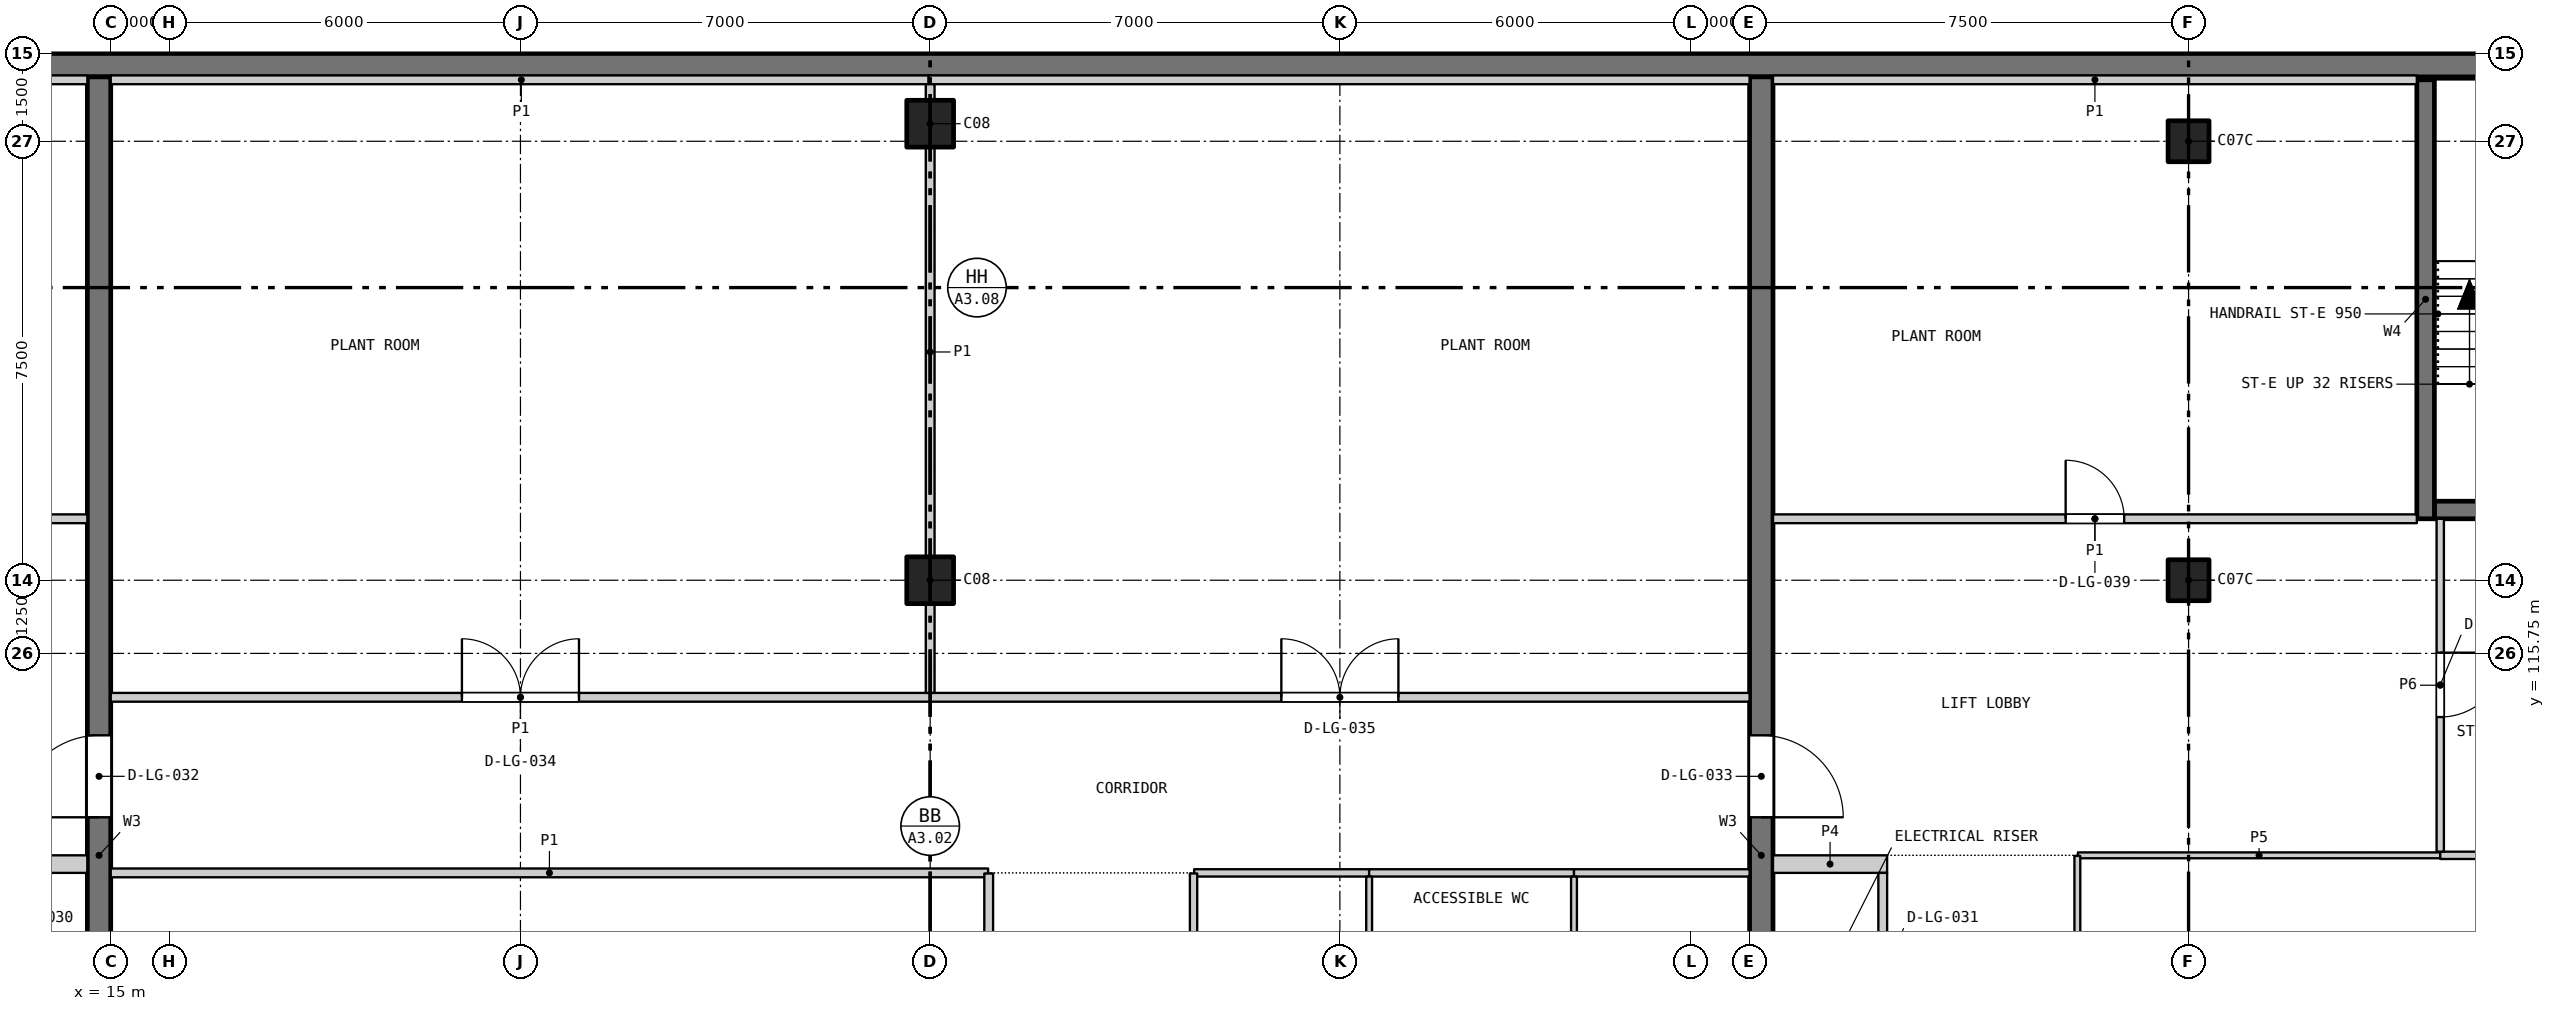
"""IFC4 building model, lengths in metres.
Left out: names, types, materials, properties, quantities, classifications, styles, units other than length and angle.
Written with IfcOpenShell. Run it as: python <this file> out.ifc"""

import sys

from ifc_helpers import new_model, si_unit, direction, frame, frame_2d, origin, origin_2d, place, context, subcontext, project, spatial, rectangle, extrude, element, fill, save


model = new_model("IFC4")
c1 = context("Model", 3, precision=1e-05, world=origin(), true_north=direction((0.0, 1.0)))
c2 = subcontext(c1, "Body", "Model", "MODEL_VIEW")
j1 = project(units=[si_unit("LENGTHUNIT", "METRE"), si_unit("PLANEANGLEUNIT", "RADIAN")], contexts=[c1])
p1 = place(None, origin())
s1 = spatial("IfcSite", under=j1, at=p1, CompositionType="ELEMENT")
p2 = place(p1, origin())
s2 = spatial("IfcBuilding", under=s1, at=p2, CompositionType="ELEMENT")
p3 = place(p2, frame((0.0, 0.0, -5.0)))
s3 = spatial("IfcBuildingStorey", under=s2, at=p3, CompositionType="ELEMENT", Elevation=-5.0)
for number, where, z_axis, x_axis in (
    (1, (50.5, 117.0, 0.0), (0.0, 0.0, 1.0), (1.0, 0.0, 0.0)),
    (2, (50.5, 124.5, 0.0), (0.0, 0.0, 1.0), (1.0, 0.0, 0.0)),
):
    element("IfcColumn", number, at=place(p3, frame(where, z_axis=z_axis, x_axis=x_axis)), inside=s3, PredefinedType="COLUMN", context=c2, shape_type="SweptSolid", body=[
        extrude(rectangle(XDim=0.7, YDim=0.7, at=origin_2d()), origin(), (0.0, 0.0, 1.0), 5.0),
    ])
for number, where, z_axis, x_axis in (
    (3, (29.0, 117.0, 0.0), (0.0, 0.0, 1.0), (1.0, 0.0, 0.0)),
    (4, (29.0, 124.8, 0.0), (0.0, 0.0, 1.0), (1.0, 0.0, 0.0)),
):
    element("IfcColumn", number, at=place(p3, frame(where, z_axis=z_axis, x_axis=x_axis)), inside=s3, PredefinedType="COLUMN", context=c2, shape_type="SweptSolid", body=[
        extrude(rectangle(XDim=0.8, YDim=0.8, at=origin_2d()), origin(), (0.0, 0.0, 1.0), 5.0),
    ])
p4 = place(p3, frame((0.4, 125.8, 0.0), z_axis=(0.0, 0.0, 1.0), x_axis=(1.0, 0.0, 0.0)))
e5 = element("IfcWall", 5, at=p4, inside=s3, PredefinedType="SOLIDWALL", context=c2, shape_type="SweptSolid", body=[
    extrude(rectangle(XDim=57.2, YDim=0.4, at=frame_2d((28.6, 0.0))), origin(), (0.0, 0.0, 1.0), 5.0),
])
p5 = place(p3, frame((14.8, 99.0, 0.0), z_axis=(0.0, 0.0, 1.0), x_axis=(0.0, 1.0, 0.0)))
e6 = element("IfcWall", 6, at=p5, inside=s3, PredefinedType="SHEAR", context=c2, shape_type="SweptSolid", body=[
    extrude(rectangle(XDim=26.6, YDim=0.4, at=frame_2d((13.3, 0.0))), origin(), (0.0, 0.0, 1.0), 5.0),
])
p6 = place(p5, frame((13.95, 0.0, 0.0)))
e7 = element("IfcOpeningElement", 7, at=p6, cuts=e6, PredefinedType="OPENING", context=c2, shape_type="SweptSolid", body=[
    extrude(rectangle(XDim=1.4, YDim=2.4, at=frame_2d((0.7, 1.2))), frame((0.0, 0.21, 0.0), z_axis=(0.0, -1.0, 0.0), x_axis=(1.0, 0.0, 0.0)), (0.0, 0.0, 1.0), 0.42),
])
p7 = place(p3, frame((43.2, 99.0, 0.0), z_axis=(0.0, 0.0, 1.0), x_axis=(0.0, 1.0, 0.0)))
e8 = element("IfcWall", 8, at=p7, inside=s3, PredefinedType="SHEAR", context=c2, shape_type="SweptSolid", body=[
    extrude(rectangle(XDim=26.6, YDim=0.4, at=frame_2d((13.3, 0.0))), origin(), (0.0, 0.0, 1.0), 5.0),
])
p8 = place(p7, frame((13.95, 0.0, 0.0)))
e9 = element("IfcOpeningElement", 9, at=p8, cuts=e8, PredefinedType="OPENING", context=c2, shape_type="SweptSolid", body=[
    extrude(rectangle(XDim=1.4, YDim=2.4, at=frame_2d((0.7, 1.2))), frame((0.0, 0.21, 0.0), z_axis=(0.0, -1.0, 0.0), x_axis=(1.0, 0.0, 0.0)), (0.0, 0.0, 1.0), 0.42),
])
p9 = place(p3, frame((54.7, 118.2, 0.0), z_axis=(0.0, 0.0, 1.0), x_axis=(1.0, 0.0, 0.0)))
e10 = element("IfcWall", 10, at=p9, inside=s3, PredefinedType="SHEAR", context=c2, shape_type="SweptSolid", body=[
    extrude(rectangle(XDim=3.0, YDim=0.3, at=frame_2d((1.5, 0.0))), origin(), (0.0, 0.0, 1.0), 5.0),
])
p10 = place(p9, frame((0.95, 0.0, 0.0)))
e11 = element("IfcOpeningElement", 11, at=p10, cuts=e10, PredefinedType="OPENING", context=c2, shape_type="SweptSolid", body=[
    extrude(rectangle(XDim=1.1, YDim=2.1, at=frame_2d((0.55, 1.05))), frame((0.0, 0.16, 0.0), z_axis=(0.0, -1.0, 0.0), x_axis=(1.0, 0.0, 0.0)), (0.0, 0.0, 1.0), 0.32),
])
p11 = place(p3, frame((54.55, 118.05, 0.0), z_axis=(0.0, 0.0, 1.0), x_axis=(0.0, 1.0, 0.0)))
e12 = element("IfcWall", 12, at=p11, inside=s3, PredefinedType="SHEAR", context=c2, shape_type="SweptSolid", body=[
    extrude(rectangle(XDim=7.5, YDim=0.3, at=frame_2d((3.75, 0.0))), origin(), (0.0, 0.0, 1.0), 5.0),
])
for number, where, z_axis, x_axis in (
    (13, (12.65, 112.15, 0.0), (0.0, 0.0, 1.0), (1.0, 0.0, 0.0)),
    (14, (43.4, 112.15, 0.0), (0.0, 0.0, 1.0), (1.0, 0.0, 0.0)),
):
    element("IfcWall", number, at=place(p3, frame(where, z_axis=z_axis, x_axis=x_axis)), inside=s3, PredefinedType="PARTITIONING", context=c2, shape_type="SweptSolid", body=[
        extrude(rectangle(XDim=1.95, YDim=0.3, at=frame_2d((0.975, 0.0))), origin(), (0.0, 0.0, 1.0), 4.7),
    ])
p12 = place(p3, frame((45.275, 108.4, 0.0), z_axis=(0.0, 0.0, 1.0), x_axis=(0.0, 1.0, 0.0)))
e15 = element("IfcWall", 15, at=p12, inside=s3, PredefinedType="PARTITIONING", context=c2, shape_type="SweptSolid", body=[
    extrude(rectangle(XDim=3.6, YDim=0.15, at=frame_2d((1.8, 0.0))), origin(), (0.0, 0.0, 1.0), 4.7),
])
p13 = place(p12, frame((1.35, 0.0, 0.0)))
e16 = element("IfcOpeningElement", 16, at=p13, cuts=e15, PredefinedType="OPENING", context=c2, shape_type="SweptSolid", body=[
    extrude(rectangle(XDim=0.9, YDim=2.1, at=frame_2d((0.45, 1.05))), frame((0.0, 0.085, 0.0), z_axis=(0.0, -1.0, 0.0), x_axis=(1.0, 0.0, 0.0)), (0.0, 0.0, 1.0), 0.17),
])
p14 = place(p3, frame((15.0, 112.0, 0.0), z_axis=(0.0, 0.0, 1.0), x_axis=(1.0, 0.0, 0.0)))
e17 = element("IfcWall", 17, at=p14, inside=s3, PredefinedType="PARTITIONING", context=c2, shape_type="SweptSolid", body=[
    extrude(rectangle(XDim=14.99, YDim=0.15, at=frame_2d((7.495, 0.0))), origin(), (0.0, 0.0, 1.0), 4.7),
])
p15 = place(p3, frame((33.51, 112.0, 0.0), z_axis=(0.0, 0.0, 1.0), x_axis=(1.0, 0.0, 0.0)))
e18 = element("IfcWall", 18, at=p15, inside=s3, PredefinedType="PARTITIONING", context=c2, shape_type="SweptSolid", body=[
    extrude(rectangle(XDim=2.99, YDim=0.125, at=frame_2d((1.495, 0.0))), origin(), (0.0, 0.0, 1.0), 4.7),
])
p16 = place(p3, frame((36.5, 112.0, 0.0), z_axis=(0.0, 0.0, 1.0), x_axis=(1.0, 0.0, 0.0)))
e19 = element("IfcWall", 19, at=p16, inside=s3, PredefinedType="PARTITIONING", context=c2, shape_type="SweptSolid", body=[
    extrude(rectangle(XDim=3.5, YDim=0.125, at=frame_2d((1.75, 0.0))), origin(), (0.0, 0.0, 1.0), 4.7),
])
p17 = place(p3, frame((40.0, 112.0, 0.0), z_axis=(0.0, 0.0, 1.0), x_axis=(1.0, 0.0, 0.0)))
e20 = element("IfcWall", 20, at=p17, inside=s3, PredefinedType="PARTITIONING", context=c2, shape_type="SweptSolid", body=[
    extrude(rectangle(XDim=3.0, YDim=0.125, at=frame_2d((1.5, 0.0))), origin(), (0.0, 0.0, 1.0), 4.7),
])
p18 = place(p3, frame((48.61, 112.3, 0.0), z_axis=(0.0, 0.0, 1.0), x_axis=(1.0, 0.0, 0.0)))
e21 = element("IfcWall", 21, at=p18, inside=s3, PredefinedType="PARTITIONING", context=c2, shape_type="SweptSolid", body=[
    extrude(rectangle(XDim=6.19, YDim=0.1, at=frame_2d((3.095, 0.0))), origin(), (0.0, 0.0, 1.0), 4.7),
])
p19 = place(p3, frame((54.8, 112.3, 0.0), z_axis=(0.0, 0.0, 1.0), x_axis=(1.0, 0.0, 0.0)))
e22 = element("IfcWall", 22, at=p19, inside=s3, PredefinedType="PARTITIONING", context=c2, shape_type="SweptSolid", body=[
    extrude(rectangle(XDim=2.8, YDim=0.125, at=frame_2d((1.4, 0.0))), origin(), (0.0, 0.0, 1.0), 4.7),
])
p20 = place(p3, frame((15.0, 115.0, 0.0), z_axis=(0.0, 0.0, 1.0), x_axis=(1.0, 0.0, 0.0)))
e23 = element("IfcWall", 23, at=p20, inside=s3, PredefinedType="PARTITIONING", context=c2, shape_type="SweptSolid", body=[
    extrude(rectangle(XDim=14.0, YDim=0.15, at=frame_2d((7.0, 0.0))), origin(), (0.0, 0.0, 1.0), 4.7),
])
p21 = place(p20, frame((6.0, 0.0, 0.0)))
e24 = element("IfcOpeningElement", 24, at=p21, cuts=e23, PredefinedType="OPENING", context=c2, shape_type="SweptSolid", body=[
    extrude(rectangle(XDim=2.0, YDim=2.4, at=frame_2d((1.0, 1.2))), frame((0.0, 0.085, 0.0), z_axis=(0.0, -1.0, 0.0), x_axis=(1.0, 0.0, 0.0)), (0.0, 0.0, 1.0), 0.17),
])
p22 = place(p3, frame((29.0, 115.0, 0.0), z_axis=(0.0, 0.0, 1.0), x_axis=(1.0, 0.0, 0.0)))
e25 = element("IfcWall", 25, at=p22, inside=s3, PredefinedType="PARTITIONING", context=c2, shape_type="SweptSolid", body=[
    extrude(rectangle(XDim=14.0, YDim=0.15, at=frame_2d((7.0, 0.0))), origin(), (0.0, 0.0, 1.0), 4.7),
])
p23 = place(p22, frame((6.0, 0.0, 0.0)))
e26 = element("IfcOpeningElement", 26, at=p23, cuts=e25, PredefinedType="OPENING", context=c2, shape_type="SweptSolid", body=[
    extrude(rectangle(XDim=2.0, YDim=2.4, at=frame_2d((1.0, 1.2))), frame((0.0, 0.085, 0.0), z_axis=(0.0, -1.0, 0.0), x_axis=(1.0, 0.0, 0.0)), (0.0, 0.0, 1.0), 0.17),
])
p24 = place(p3, frame((3.6, 118.05, 0.0), z_axis=(0.0, 0.0, 1.0), x_axis=(1.0, 0.0, 0.0)))
e27 = element("IfcWall", 27, at=p24, inside=s3, PredefinedType="PARTITIONING", context=c2, shape_type="SweptSolid", body=[
    extrude(rectangle(XDim=11.0, YDim=0.15, at=frame_2d((5.5, 0.0))), origin(), (0.0, 0.0, 1.0), 4.7),
])
p25 = place(p24, frame((5.0, 0.0, 0.0)))
e28 = element("IfcOpeningElement", 28, at=p25, cuts=e27, PredefinedType="OPENING", context=c2, shape_type="SweptSolid", body=[
    extrude(rectangle(XDim=1.0, YDim=2.1, at=frame_2d((0.5, 1.05))), frame((0.0, 0.085, 0.0), z_axis=(0.0, -1.0, 0.0), x_axis=(1.0, 0.0, 0.0)), (0.0, 0.0, 1.0), 0.17),
])
p26 = place(p3, frame((43.4, 118.05, 0.0), z_axis=(0.0, 0.0, 1.0), x_axis=(1.0, 0.0, 0.0)))
e29 = element("IfcWall", 29, at=p26, inside=s3, PredefinedType="PARTITIONING", context=c2, shape_type="SweptSolid", body=[
    extrude(rectangle(XDim=11.0, YDim=0.15, at=frame_2d((5.5, 0.0))), origin(), (0.0, 0.0, 1.0), 4.7),
])
p27 = place(p26, frame((5.0, 0.0, 0.0)))
e30 = element("IfcOpeningElement", 30, at=p27, cuts=e29, PredefinedType="OPENING", context=c2, shape_type="SweptSolid", body=[
    extrude(rectangle(XDim=1.0, YDim=2.1, at=frame_2d((0.5, 1.05))), frame((0.0, 0.085, 0.0), z_axis=(0.0, -1.0, 0.0), x_axis=(1.0, 0.0, 0.0)), (0.0, 0.0, 1.0), 0.17),
])
p28 = place(p3, frame((3.6, 125.55, 0.0), z_axis=(0.0, 0.0, 1.0), x_axis=(1.0, 0.0, 0.0)))
e31 = element("IfcWall", 31, at=p28, inside=s3, PredefinedType="PARTITIONING", context=c2, shape_type="SweptSolid", body=[
    extrude(rectangle(XDim=11.0, YDim=0.15, at=frame_2d((5.5, 0.0))), origin(), (0.0, 0.0, 1.0), 4.7),
])
for number, where, z_axis, x_axis in (
    (32, (15.0, 125.55, 0.0), (0.0, 0.0, 1.0), (1.0, 0.0, 0.0)),
    (33, (28.97, 125.55, 0.0), (0.0, 0.0, 1.0), (1.0, 0.0, 0.0)),
):
    element("IfcWall", number, at=place(p3, frame(where, z_axis=z_axis, x_axis=x_axis)), inside=s3, PredefinedType="PARTITIONING", context=c2, shape_type="SweptSolid", body=[
        extrude(rectangle(XDim=14.03, YDim=0.15, at=frame_2d((7.015, 0.0))), origin(), (0.0, 0.0, 1.0), 4.7),
    ])
p29 = place(p3, frame((43.4, 125.55, 0.0), z_axis=(0.0, 0.0, 1.0), x_axis=(1.0, 0.0, 0.0)))
e34 = element("IfcWall", 34, at=p29, inside=s3, PredefinedType="PARTITIONING", context=c2, shape_type="SweptSolid", body=[
    extrude(rectangle(XDim=11.0, YDim=0.15, at=frame_2d((5.5, 0.0))), origin(), (0.0, 0.0, 1.0), 4.7),
])
p30 = place(p3, frame((29.0, 115.075, 0.0), z_axis=(0.0, 0.0, 1.0), x_axis=(0.0, 1.0, 0.0)))
e35 = element("IfcWall", 35, at=p30, inside=s3, PredefinedType="PARTITIONING", context=c2, shape_type="SweptSolid", body=[
    extrude(rectangle(XDim=1.525, YDim=0.15, at=frame_2d((0.763, 0.0))), origin(), (0.0, 0.0, 1.0), 3.6),
])
p31 = place(p3, frame((29.0, 117.4, 0.0), z_axis=(0.0, 0.0, 1.0), x_axis=(0.0, 1.0, 0.0)))
e36 = element("IfcWall", 36, at=p31, inside=s3, PredefinedType="PARTITIONING", context=c2, shape_type="SweptSolid", body=[
    extrude(rectangle(XDim=7.0, YDim=0.15, at=frame_2d((3.5, 0.0))), origin(), (0.0, 0.0, 1.0), 3.6),
])
p32 = place(p3, frame((29.0, 125.2, 0.0), z_axis=(0.0, 0.0, 1.0), x_axis=(0.0, 1.0, 0.0)))
e37 = element("IfcWall", 37, at=p32, inside=s3, PredefinedType="PARTITIONING", context=c2, shape_type="SweptSolid", body=[
    extrude(rectangle(XDim=0.275, YDim=0.15, at=frame_2d((0.138, 0.0))), origin(), (0.0, 0.0, 1.0), 4.7),
])
p33 = place(p3, frame((30.0, 99.01, 0.0), z_axis=(0.0, 0.0, 1.0), x_axis=(0.0, 1.0, 0.0)))
e38 = element("IfcWall", 38, at=p33, inside=s3, PredefinedType="PARTITIONING", context=c2, shape_type="SweptSolid", body=[
    extrude(rectangle(XDim=12.98, YDim=0.15, at=frame_2d((6.49, 0.0))), origin(), (0.0, 0.0, 1.0), 4.7),
])
p34 = place(p33, frame((5.5, 0.0, 0.0)))
e39 = element("IfcOpeningElement", 39, at=p34, cuts=e38, PredefinedType="OPENING", context=c2, shape_type="SweptSolid", body=[
    extrude(rectangle(XDim=2.0, YDim=2.4, at=frame_2d((1.0, 1.2))), frame((0.0, 0.085, 0.0), z_axis=(0.0, -1.0, 0.0), x_axis=(1.0, 0.0, 0.0)), (0.0, 0.0, 1.0), 0.17),
])
p35 = place(p3, frame((33.5, 99.062, 0.0), z_axis=(0.0, 0.0, 1.0), x_axis=(0.0, 1.0, 0.0)))
e40 = element("IfcWall", 40, at=p35, inside=s3, PredefinedType="PARTITIONING", context=c2, shape_type="SweptSolid", body=[
    extrude(rectangle(XDim=12.927, YDim=0.125, at=frame_2d((6.464, 0.0))), origin(), (0.0, 0.0, 1.0), 4.7),
])
p36 = place(p35, frame((5.95, 0.0, 0.0)))
e41 = element("IfcOpeningElement", 41, at=p36, cuts=e40, PredefinedType="OPENING", context=c2, shape_type="SweptSolid", body=[
    extrude(rectangle(XDim=1.0, YDim=2.1, at=frame_2d((0.5, 1.05))), frame((0.0, 0.073, 0.0), z_axis=(0.0, -1.0, 0.0), x_axis=(1.0, 0.0, 0.0)), (0.0, 0.0, 1.0), 0.145),
])
p37 = place(p3, frame((36.5, 108.0, 0.0), z_axis=(0.0, 0.0, 1.0), x_axis=(0.0, 1.0, 0.0)))
e42 = element("IfcWall", 42, at=p37, inside=s3, PredefinedType="PARTITIONING", context=c2, shape_type="SweptSolid", body=[
    extrude(rectangle(XDim=3.938, YDim=0.1, at=frame_2d((1.969, 0.0))), origin(), (0.0, 0.0, 1.0), 4.7),
])
p38 = place(p37, frame((1.45, 0.0, 0.0)))
e43 = element("IfcOpeningElement", 43, at=p38, cuts=e42, PredefinedType="OPENING", context=c2, shape_type="SweptSolid", body=[
    extrude(rectangle(XDim=1.0, YDim=2.1, at=frame_2d((0.5, 1.05))), frame((0.0, 0.06, 0.0), z_axis=(0.0, -1.0, 0.0), x_axis=(1.0, 0.0, 0.0)), (0.0, 0.0, 1.0), 0.12),
])
p39 = place(p3, frame((40.0, 108.05, 0.0), z_axis=(0.0, 0.0, 1.0), x_axis=(0.0, 1.0, 0.0)))
e44 = element("IfcWall", 44, at=p39, inside=s3, PredefinedType="PARTITIONING", context=c2, shape_type="SweptSolid", body=[
    extrude(rectangle(XDim=3.887, YDim=0.1, at=frame_2d((1.944, 0.0))), origin(), (0.0, 0.0, 1.0), 4.7),
])
p40 = place(p3, frame((48.6, 108.975, 0.0), z_axis=(0.0, 0.0, 1.0), x_axis=(0.0, 1.0, 0.0)))
e45 = element("IfcWall", 45, at=p40, inside=s3, PredefinedType="PARTITIONING", context=c2, shape_type="SweptSolid", body=[
    extrude(rectangle(XDim=3.315, YDim=0.1, at=frame_2d((1.657, 0.0))), origin(), (0.0, 0.0, 1.0), 4.7),
])
p41 = place(p3, frame((54.8, 112.363, 0.0), z_axis=(0.0, 0.0, 1.0), x_axis=(0.0, 1.0, 0.0)))
e46 = element("IfcWall", 46, at=p41, inside=s3, PredefinedType="PARTITIONING", context=c2, shape_type="SweptSolid", body=[
    extrude(rectangle(XDim=5.688, YDim=0.125, at=frame_2d((2.844, 0.0))), origin(), (0.0, 0.0, 1.0), 4.7),
])
p42 = place(p41, frame((2.3, 0.0, 0.0)))
e47 = element("IfcOpeningElement", 47, at=p42, cuts=e46, PredefinedType="OPENING", context=c2, shape_type="SweptSolid", body=[
    extrude(rectangle(XDim=1.1, YDim=2.1, at=frame_2d((0.55, 1.05))), frame((0.0, 0.073, 0.0), z_axis=(0.0, -1.0, 0.0), x_axis=(1.0, 0.0, 0.0)), (0.0, 0.0, 1.0), 0.145),
])
p43 = place(p6, origin())
e48 = element("IfcDoor", 48, at=p43, inside=s3, OperationType="SINGLE_SWING_LEFT", PredefinedType="DOOR", context=c2, shape_type="SweptSolid", body=[
    extrude(rectangle(XDim=1.4, YDim=2.4, at=frame_2d((0.7, 1.2))), frame((0.0, 0.025, 0.0), z_axis=(0.0, -1.0, 0.0), x_axis=(1.0, 0.0, 0.0)), (0.0, 0.0, 1.0), 0.05),
])
fill(e7, e48)
p44 = place(p8, frame((1.4, 0.0, 0.0), z_axis=(0.0, 0.0, 1.0), x_axis=(-1.0, 0.0, 0.0)))
e49 = element("IfcDoor", 49, at=p44, inside=s3, OperationType="SINGLE_SWING_RIGHT", PredefinedType="DOOR", context=c2, shape_type="SweptSolid", body=[
    extrude(rectangle(XDim=1.4, YDim=2.4, at=frame_2d((0.7, 1.2))), frame((0.0, 0.025, 0.0), z_axis=(0.0, -1.0, 0.0), x_axis=(1.0, 0.0, 0.0)), (0.0, 0.0, 1.0), 0.05),
])
fill(e9, e49)
p45 = place(p21, origin())
e50 = element("IfcDoor", 50, at=p45, inside=s3, OperationType="DOUBLE_DOOR_SINGLE_SWING", PredefinedType="DOOR", context=c2, shape_type="SweptSolid", body=[
    extrude(rectangle(XDim=2.0, YDim=2.4, at=frame_2d((1.0, 1.2))), frame((0.0, 0.025, 0.0), z_axis=(0.0, -1.0, 0.0), x_axis=(1.0, 0.0, 0.0)), (0.0, 0.0, 1.0), 0.05),
])
fill(e24, e50)
p46 = place(p23, origin())
e51 = element("IfcDoor", 51, at=p46, inside=s3, OperationType="DOUBLE_DOOR_SINGLE_SWING", PredefinedType="DOOR", context=c2, shape_type="SweptSolid", body=[
    extrude(rectangle(XDim=2.0, YDim=2.4, at=frame_2d((1.0, 1.2))), frame((0.0, 0.025, 0.0), z_axis=(0.0, -1.0, 0.0), x_axis=(1.0, 0.0, 0.0)), (0.0, 0.0, 1.0), 0.05),
])
fill(e26, e51)
p47 = place(p42, frame((1.1, 0.0, 0.0), z_axis=(0.0, 0.0, 1.0), x_axis=(-1.0, 0.0, 0.0)))
e52 = element("IfcDoor", 52, at=p47, inside=s3, OperationType="SINGLE_SWING_LEFT", PredefinedType="DOOR", context=c2, shape_type="SweptSolid", body=[
    extrude(rectangle(XDim=1.1, YDim=2.1, at=frame_2d((0.55, 1.05))), frame((0.0, 0.025, 0.0), z_axis=(0.0, -1.0, 0.0), x_axis=(1.0, 0.0, 0.0)), (0.0, 0.0, 1.0), 0.05),
])
fill(e47, e52)
p48 = place(p27, origin())
e53 = element("IfcDoor", 53, at=p48, inside=s3, OperationType="SINGLE_SWING_LEFT", PredefinedType="DOOR", context=c2, shape_type="SweptSolid", body=[
    extrude(rectangle(XDim=1.0, YDim=2.1, at=frame_2d((0.5, 1.05))), frame((0.0, 0.025, 0.0), z_axis=(0.0, -1.0, 0.0), x_axis=(1.0, 0.0, 0.0)), (0.0, 0.0, 1.0), 0.05),
])
fill(e30, e53)
save(model, sys.argv[1])
